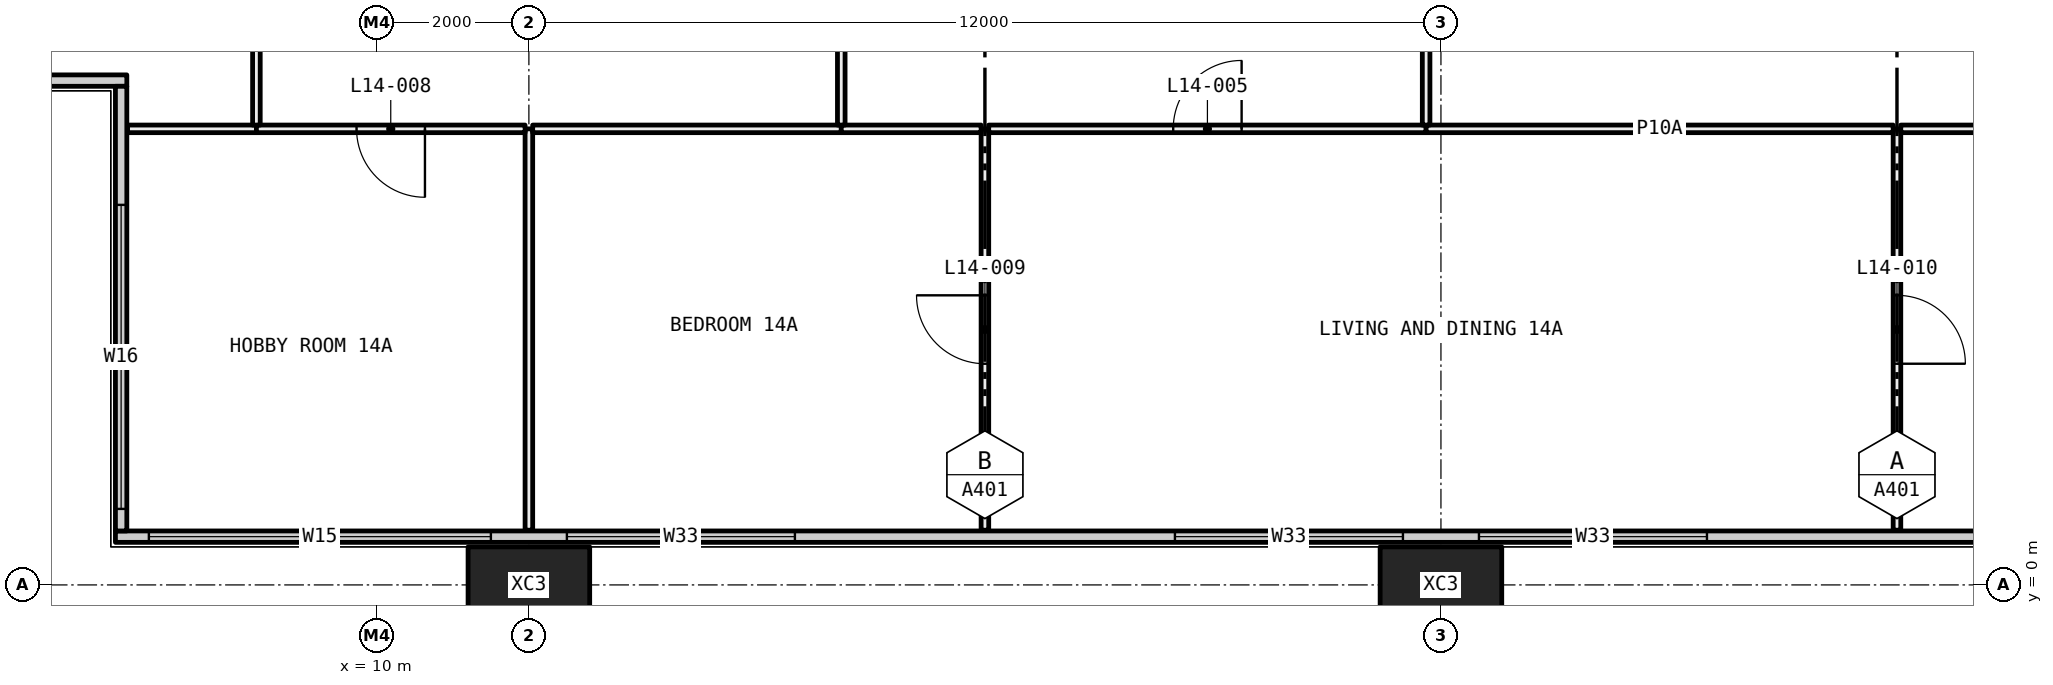
"""IFC4 building model, lengths in metres.
Left out: names, types, materials, properties, quantities, classifications, styles, units other than length and angle.
Written with IfcOpenShell. Run it as: python <this file> out.ifc"""

import sys

from ifc_helpers import new_model, si_unit, direction, frame, frame_2d, origin, origin_2d, place, context, subcontext, project, spatial, rectangle, hollow_rectangle, extrude, element, fill, save


model = new_model("IFC4")
c1 = context("Model", 3, precision=1e-05, world=origin(), true_north=direction((0.0, 1.0)))
c2 = subcontext(c1, "Body", "Model", "MODEL_VIEW")
j1 = project(units=[si_unit("LENGTHUNIT", "METRE"), si_unit("PLANEANGLEUNIT", "RADIAN")], contexts=[c1])
p1 = place(None, origin())
s1 = spatial("IfcSite", under=j1, at=p1, CompositionType="ELEMENT")
p2 = place(p1, origin())
s2 = spatial("IfcBuilding", under=s1, at=p2, CompositionType="ELEMENT")
p3 = place(p2, frame((0.0, 0.0, 61.05)))
s3 = spatial("IfcBuildingStorey", under=s2, at=p3, CompositionType="ELEMENT", Elevation=61.05)
for number, where, z_axis, x_axis in (
    (1, (12.0, 0.0, -0.4), (0.0, 0.0, 1.0), (1.0, 0.0, 0.0)),
    (2, (24.0, 0.0, -0.4), (0.0, 0.0, 1.0), (1.0, 0.0, 0.0)),
):
    element("IfcColumn", number, at=place(p3, frame(where, z_axis=z_axis, x_axis=x_axis)), inside=s3, PredefinedType="COLUMN", context=c2, shape_type="SweptSolid", body=[
        extrude(hollow_rectangle(XDim=1.6, YDim=1.0, WallThickness=0.065, at=origin_2d()), origin(), (0.0, 0.0, 1.0), 3.45),
    ])
p4 = place(p3, frame((6.56, 0.635, 0.0), z_axis=(0.0, 0.0, 1.0), x_axis=(1.0, 0.0, 0.0)))
e3 = element("IfcWall", 3, at=p4, inside=s3, PredefinedType="ELEMENTEDWALL", context=c2, shape_type="SweptSolid", body=[
    extrude(rectangle(XDim=58.88, YDim=0.15, at=frame_2d((29.44, 0.0))), origin(), (0.0, 0.0, 1.0), 3.05),
])
p5 = place(p4, frame((0.44, 0.0, 0.45)))
e4 = element("IfcOpeningElement", 4, at=p5, cuts=e3, PredefinedType="OPENING", context=c2, shape_type="SweptSolid", body=[
    extrude(rectangle(XDim=4.5, YDim=2.55, at=frame_2d((2.25, 1.275))), frame((0.0, 0.085, 0.0), z_axis=(0.0, -1.0, 0.0), x_axis=(1.0, 0.0, 0.0)), (0.0, 0.0, 1.0), 0.17),
])
p6 = place(p4, frame((5.94, 0.0, 0.45)))
e5 = element("IfcOpeningElement", 5, at=p6, cuts=e3, PredefinedType="OPENING", context=c2, shape_type="SweptSolid", body=[
    extrude(rectangle(XDim=3.0, YDim=2.55, at=frame_2d((1.5, 1.275))), frame((0.0, 0.085, 0.0), z_axis=(0.0, -1.0, 0.0), x_axis=(1.0, 0.0, 0.0)), (0.0, 0.0, 1.0), 0.17),
])
p7 = place(p4, frame((13.94, 0.0, 0.45)))
e6 = element("IfcOpeningElement", 6, at=p7, cuts=e3, PredefinedType="OPENING", context=c2, shape_type="SweptSolid", body=[
    extrude(rectangle(XDim=3.0, YDim=2.55, at=frame_2d((1.5, 1.275))), frame((0.0, 0.085, 0.0), z_axis=(0.0, -1.0, 0.0), x_axis=(1.0, 0.0, 0.0)), (0.0, 0.0, 1.0), 0.17),
])
p8 = place(p4, frame((17.94, 0.0, 0.45)))
e7 = element("IfcOpeningElement", 7, at=p8, cuts=e3, PredefinedType="OPENING", context=c2, shape_type="SweptSolid", body=[
    extrude(rectangle(XDim=3.0, YDim=2.55, at=frame_2d((1.5, 1.275))), frame((0.0, 0.085, 0.0), z_axis=(0.0, -1.0, 0.0), x_axis=(1.0, 0.0, 0.0)), (0.0, 0.0, 1.0), 0.17),
])
p9 = place(p4, frame((26.94, 0.0, 0.45)))
e8 = element("IfcOpeningElement", 8, at=p9, cuts=e3, PredefinedType="OPENING", context=c2, shape_type="SweptSolid", body=[
    extrude(rectangle(XDim=2.0, YDim=2.55, at=frame_2d((1.0, 1.275))), frame((0.0, 0.085, 0.0), z_axis=(0.0, -1.0, 0.0), x_axis=(1.0, 0.0, 0.0)), (0.0, 0.0, 1.0), 0.17),
])
p10 = place(p4, frame((29.94, 0.0, 0.45)))
e9 = element("IfcOpeningElement", 9, at=p10, cuts=e3, PredefinedType="OPENING", context=c2, shape_type="SweptSolid", body=[
    extrude(rectangle(XDim=3.0, YDim=2.55, at=frame_2d((1.5, 1.275))), frame((0.0, 0.085, 0.0), z_axis=(0.0, -1.0, 0.0), x_axis=(1.0, 0.0, 0.0)), (0.0, 0.0, 1.0), 0.17),
])
p11 = place(p4, frame((37.94, 0.0, 0.45)))
e10 = element("IfcOpeningElement", 10, at=p11, cuts=e3, PredefinedType="OPENING", context=c2, shape_type="SweptSolid", body=[
    extrude(rectangle(XDim=3.0, YDim=2.55, at=frame_2d((1.5, 1.275))), frame((0.0, 0.085, 0.0), z_axis=(0.0, -1.0, 0.0), x_axis=(1.0, 0.0, 0.0)), (0.0, 0.0, 1.0), 0.17),
])
p12 = place(p4, frame((41.94, 0.0, 0.45)))
e11 = element("IfcOpeningElement", 11, at=p12, cuts=e3, PredefinedType="OPENING", context=c2, shape_type="SweptSolid", body=[
    extrude(rectangle(XDim=3.0, YDim=2.55, at=frame_2d((1.5, 1.275))), frame((0.0, 0.085, 0.0), z_axis=(0.0, -1.0, 0.0), x_axis=(1.0, 0.0, 0.0)), (0.0, 0.0, 1.0), 0.17),
])
p13 = place(p4, frame((50.94, 0.0, 0.45)))
e12 = element("IfcOpeningElement", 12, at=p13, cuts=e3, PredefinedType="OPENING", context=c2, shape_type="SweptSolid", body=[
    extrude(rectangle(XDim=2.0, YDim=2.55, at=frame_2d((1.0, 1.275))), frame((0.0, 0.085, 0.0), z_axis=(0.0, -1.0, 0.0), x_axis=(1.0, 0.0, 0.0)), (0.0, 0.0, 1.0), 0.17),
])
p14 = place(p4, frame((53.94, 0.0, 0.45)))
e13 = element("IfcOpeningElement", 13, at=p14, cuts=e3, PredefinedType="OPENING", context=c2, shape_type="SweptSolid", body=[
    extrude(rectangle(XDim=4.5, YDim=2.55, at=frame_2d((2.25, 1.275))), frame((0.0, 0.085, 0.0), z_axis=(0.0, -1.0, 0.0), x_axis=(1.0, 0.0, 0.0)), (0.0, 0.0, 1.0), 0.17),
])
p15 = place(p3, frame((0.56, 6.635, 0.0), z_axis=(0.0, 0.0, 1.0), x_axis=(1.0, 0.0, 0.0)))
e14 = element("IfcWall", 14, at=p15, inside=s3, PredefinedType="ELEMENTEDWALL", context=c2, shape_type="SweptSolid", body=[
    extrude(rectangle(XDim=6.15, YDim=0.15, at=frame_2d((3.075, 0.0))), origin(), (0.0, 0.0, 1.0), 3.05),
])
p16 = place(p15, frame((0.44, 0.0, 0.45)))
e15 = element("IfcOpeningElement", 15, at=p16, cuts=e14, PredefinedType="OPENING", context=c2, shape_type="SweptSolid", body=[
    extrude(rectangle(XDim=4.0, YDim=2.55, at=frame_2d((2.0, 1.275))), frame((0.0, 0.085, 0.0), z_axis=(0.0, -1.0, 0.0), x_axis=(1.0, 0.0, 0.0)), (0.0, 0.0, 1.0), 0.17),
])
p17 = place(p3, frame((6.635, 0.71, 0.0), z_axis=(0.0, 0.0, 1.0), x_axis=(0.0, 1.0, 0.0)))
e16 = element("IfcWall", 16, at=p17, inside=s3, PredefinedType="ELEMENTEDWALL", context=c2, shape_type="SweptSolid", body=[
    extrude(rectangle(XDim=5.85, YDim=0.15, at=frame_2d((2.925, 0.0))), origin(), (0.0, 0.0, 1.0), 3.05),
])
p18 = place(p17, frame((0.29, 0.0, 0.45)))
e17 = element("IfcOpeningElement", 17, at=p18, cuts=e16, PredefinedType="OPENING", context=c2, shape_type="SweptSolid", body=[
    extrude(rectangle(XDim=4.0, YDim=2.55, at=frame_2d((2.0, 1.275))), frame((0.0, 0.085, 0.0), z_axis=(0.0, -1.0, 0.0), x_axis=(1.0, 0.0, 0.0)), (0.0, 0.0, 1.0), 0.17),
])
p19 = place(p3, frame((12.0, 0.72, 0.0), z_axis=(0.0, 0.0, 1.0), x_axis=(0.0, 1.0, 0.0)))
e18 = element("IfcWall", 18, at=p19, inside=s3, PredefinedType="PARTITIONING", context=c2, shape_type="SweptSolid", body=[
    extrude(rectangle(XDim=5.28, YDim=0.1, at=frame_2d((2.64, 0.0))), origin(), (0.0, 0.0, 1.0), 2.45),
])
p20 = place(p3, frame((8.415, 6.0, 0.0), z_axis=(0.0, 0.0, 1.0), x_axis=(-1.0, 0.0, 0.0)))
e19 = element("IfcWall", 19, at=p20, inside=s3, PredefinedType="PARTITIONING", context=c2, shape_type="SweptSolid", body=[
    extrude(rectangle(XDim=1.695, YDim=0.1, at=frame_2d((0.848, 0.0))), origin(), (0.0, 0.0, 1.0), 3.05),
])
p21 = place(p3, frame((11.95, 6.0, 0.0), z_axis=(0.0, 0.0, 1.0), x_axis=(-1.0, 0.0, 0.0)))
e20 = element("IfcWall", 20, at=p21, inside=s3, PredefinedType="PARTITIONING", context=c2, shape_type="SweptSolid", body=[
    extrude(rectangle(XDim=3.535, YDim=0.1, at=frame_2d((1.768, 0.0))), origin(), (0.0, 0.0, 1.0), 2.45),
])
p22 = place(p21, frame((1.317, 0.0, 0.0)))
e21 = element("IfcOpeningElement", 21, at=p22, cuts=e20, PredefinedType="OPENING", context=c2, shape_type="SweptSolid", body=[
    extrude(rectangle(XDim=0.9, YDim=2.1, at=frame_2d((0.45, 1.05))), frame((0.0, 0.06, 0.0), z_axis=(0.0, -1.0, 0.0), x_axis=(1.0, 0.0, 0.0)), (0.0, 0.0, 1.0), 0.12),
])
p23 = place(p3, frame((18.0, 0.72, 0.0), z_axis=(0.0, 0.0, 1.0), x_axis=(0.0, 1.0, 0.0)))
e22 = element("IfcWall", 22, at=p23, inside=s3, PredefinedType="PARTITIONING", context=c2, shape_type="SweptSolid", body=[
    extrude(rectangle(XDim=5.28, YDim=0.1, at=frame_2d((2.64, 0.0))), origin(), (0.0, 0.0, 1.0), 3.05),
])
p24 = place(p23, frame((2.19, 0.0, 0.0)))
e23 = element("IfcOpeningElement", 23, at=p24, cuts=e22, PredefinedType="OPENING", context=c2, shape_type="SweptSolid", body=[
    extrude(rectangle(XDim=0.9, YDim=2.1, at=frame_2d((0.45, 1.05))), frame((0.0, 0.06, 0.0), z_axis=(0.0, -1.0, 0.0), x_axis=(1.0, 0.0, 0.0)), (0.0, 0.0, 1.0), 0.12),
])
p25 = place(p3, frame((16.11, 6.0, 0.0), z_axis=(0.0, 0.0, 1.0), x_axis=(-1.0, 0.0, 0.0)))
e24 = element("IfcWall", 24, at=p25, inside=s3, PredefinedType="PARTITIONING", context=c2, shape_type="SweptSolid", body=[
    extrude(rectangle(XDim=4.06, YDim=0.1, at=frame_2d((2.03, 0.0))), origin(), (0.0, 0.0, 1.0), 2.45),
])
p26 = place(p3, frame((17.95, 6.0, 0.0), z_axis=(0.0, 0.0, 1.0), x_axis=(-1.0, 0.0, 0.0)))
e25 = element("IfcWall", 25, at=p26, inside=s3, PredefinedType="PARTITIONING", context=c2, shape_type="SweptSolid", body=[
    extrude(rectangle(XDim=1.84, YDim=0.1, at=frame_2d((0.92, 0.0))), origin(), (0.0, 0.0, 1.0), 3.05),
])
p27 = place(p3, frame((30.0, 0.72, 0.0), z_axis=(0.0, 0.0, 1.0), x_axis=(0.0, 1.0, 0.0)))
e26 = element("IfcWall", 26, at=p27, inside=s3, PredefinedType="PARTITIONING", context=c2, shape_type="SweptSolid", body=[
    extrude(rectangle(XDim=5.28, YDim=0.1, at=frame_2d((2.64, 0.0))), origin(), (0.0, 0.0, 1.0), 3.05),
])
p28 = place(p27, frame((2.19, 0.0, 0.0)))
e27 = element("IfcOpeningElement", 27, at=p28, cuts=e26, PredefinedType="OPENING", context=c2, shape_type="SweptSolid", body=[
    extrude(rectangle(XDim=0.9, YDim=2.1, at=frame_2d((0.45, 1.05))), frame((0.0, 0.06, 0.0), z_axis=(0.0, -1.0, 0.0), x_axis=(1.0, 0.0, 0.0)), (0.0, 0.0, 1.0), 0.12),
])
p29 = place(p3, frame((23.805, 6.0, 0.0), z_axis=(0.0, 0.0, 1.0), x_axis=(-1.0, 0.0, 0.0)))
e28 = element("IfcWall", 28, at=p29, inside=s3, PredefinedType="PARTITIONING", context=c2, shape_type="SweptSolid", body=[
    extrude(rectangle(XDim=5.755, YDim=0.1, at=frame_2d((2.877, 0.0))), origin(), (0.0, 0.0, 1.0), 3.05),
])
p30 = place(p29, frame((2.427, 0.0, 0.0)))
e29 = element("IfcOpeningElement", 29, at=p30, cuts=e28, PredefinedType="OPENING", context=c2, shape_type="SweptSolid", body=[
    extrude(rectangle(XDim=0.9, YDim=2.1, at=frame_2d((0.45, 1.05))), frame((0.0, 0.06, 0.0), z_axis=(0.0, -1.0, 0.0), x_axis=(1.0, 0.0, 0.0)), (0.0, 0.0, 1.0), 0.12),
])
p31 = place(p3, frame((29.95, 6.0, 0.0), z_axis=(0.0, 0.0, 1.0), x_axis=(-1.0, 0.0, 0.0)))
e30 = element("IfcWall", 30, at=p31, inside=s3, PredefinedType="PARTITIONING", context=c2, shape_type="SweptSolid", body=[
    extrude(rectangle(XDim=6.145, YDim=0.1, at=frame_2d((3.073, 0.0))), origin(), (0.0, 0.0, 1.0), 2.45),
])
p32 = place(p3, frame((31.425, 6.0, 0.0), z_axis=(0.0, 0.0, 1.0), x_axis=(-1.0, 0.0, 0.0)))
e31 = element("IfcWall", 31, at=p32, inside=s3, PredefinedType="PARTITIONING", context=c2, shape_type="SweptSolid", body=[
    extrude(rectangle(XDim=1.375, YDim=0.1, at=frame_2d((0.688, 0.0))), origin(), (0.0, 0.0, 1.0), 3.05),
])
p33 = place(p3, frame((8.415, 6.05, 0.0), z_axis=(0.0, 0.0, 1.0), x_axis=(0.0, 1.0, 0.0)))
e32 = element("IfcWall", 32, at=p33, inside=s3, PredefinedType="PARTITIONING", context=c2, shape_type="SweptSolid", body=[
    extrude(rectangle(XDim=5.875, YDim=0.1, at=frame_2d((2.938, 0.0))), origin(), (0.0, 0.0, 1.0), 2.45),
])
p34 = place(p33, frame((2.488, 0.0, 0.0)))
e33 = element("IfcOpeningElement", 33, at=p34, cuts=e32, PredefinedType="OPENING", context=c2, shape_type="SweptSolid", body=[
    extrude(rectangle(XDim=0.9, YDim=2.1, at=frame_2d((0.45, 1.05))), frame((0.0, 0.06, 0.0), z_axis=(0.0, -1.0, 0.0), x_axis=(1.0, 0.0, 0.0)), (0.0, 0.0, 1.0), 0.12),
])
p35 = place(p3, frame((16.11, 6.05, 0.0), z_axis=(0.0, 0.0, 1.0), x_axis=(0.0, 1.0, 0.0)))
e34 = element("IfcWall", 34, at=p35, inside=s3, PredefinedType="PARTITIONING", context=c2, shape_type="SweptSolid", body=[
    extrude(rectangle(XDim=5.95, YDim=0.1, at=frame_2d((2.975, 0.0))), origin(), (0.0, 0.0, 1.0), 2.45),
])
p36 = place(p3, frame((23.805, 6.05, 0.0), z_axis=(0.0, 0.0, 1.0), x_axis=(0.0, 1.0, 0.0)))
e35 = element("IfcWall", 35, at=p36, inside=s3, PredefinedType="PARTITIONING", context=c2, shape_type="SweptSolid", body=[
    extrude(rectangle(XDim=5.15, YDim=0.1, at=frame_2d((2.575, 0.0))), origin(), (0.0, 0.0, 1.0), 3.05),
])
p37 = place(p36, frame((2.125, 0.0, 0.0)))
e36 = element("IfcOpeningElement", 36, at=p37, cuts=e35, PredefinedType="OPENING", context=c2, shape_type="SweptSolid", body=[
    extrude(rectangle(XDim=0.9, YDim=2.1, at=frame_2d((0.45, 1.05))), frame((0.0, 0.06, 0.0), z_axis=(0.0, -1.0, 0.0), x_axis=(1.0, 0.0, 0.0)), (0.0, 0.0, 1.0), 0.12),
])
p38 = place(p5, origin())
e37 = element("IfcWindow", 37, at=p38, inside=s3, PartitioningType="SINGLE_PANEL", PredefinedType="WINDOW", context=c2, shape_type="SweptSolid", body=[
    extrude(rectangle(XDim=4.5, YDim=2.55, at=frame_2d((2.25, 1.275))), frame((0.0, 0.03, 0.0), z_axis=(0.0, -1.0, 0.0), x_axis=(1.0, 0.0, 0.0)), (0.0, 0.0, 1.0), 0.06),
])
fill(e4, e37)
p39 = place(p6, origin())
e38 = element("IfcWindow", 38, at=p39, inside=s3, PartitioningType="SINGLE_PANEL", PredefinedType="WINDOW", context=c2, shape_type="SweptSolid", body=[
    extrude(rectangle(XDim=3.0, YDim=2.55, at=frame_2d((1.5, 1.275))), frame((0.0, 0.03, 0.0), z_axis=(0.0, -1.0, 0.0), x_axis=(1.0, 0.0, 0.0)), (0.0, 0.0, 1.0), 0.06),
])
fill(e5, e38)
p40 = place(p7, origin())
e39 = element("IfcWindow", 39, at=p40, inside=s3, PartitioningType="SINGLE_PANEL", PredefinedType="WINDOW", context=c2, shape_type="SweptSolid", body=[
    extrude(rectangle(XDim=3.0, YDim=2.55, at=frame_2d((1.5, 1.275))), frame((0.0, 0.03, 0.0), z_axis=(0.0, -1.0, 0.0), x_axis=(1.0, 0.0, 0.0)), (0.0, 0.0, 1.0), 0.06),
])
fill(e6, e39)
p41 = place(p8, origin())
e40 = element("IfcWindow", 40, at=p41, inside=s3, PartitioningType="SINGLE_PANEL", PredefinedType="WINDOW", context=c2, shape_type="SweptSolid", body=[
    extrude(rectangle(XDim=3.0, YDim=2.55, at=frame_2d((1.5, 1.275))), frame((0.0, 0.03, 0.0), z_axis=(0.0, -1.0, 0.0), x_axis=(1.0, 0.0, 0.0)), (0.0, 0.0, 1.0), 0.06),
])
fill(e7, e40)
p42 = place(p18, origin())
e41 = element("IfcWindow", 41, at=p42, inside=s3, PartitioningType="SINGLE_PANEL", PredefinedType="WINDOW", context=c2, shape_type="SweptSolid", body=[
    extrude(rectangle(XDim=4.0, YDim=2.55, at=frame_2d((2.0, 1.275))), frame((0.0, 0.03, 0.0), z_axis=(0.0, -1.0, 0.0), x_axis=(1.0, 0.0, 0.0)), (0.0, 0.0, 1.0), 0.06),
])
fill(e17, e41)
p43 = place(p30, frame((0.9, 0.0, 0.0), x_axis=(-1.0, 0.0, 0.0)))
e42 = element("IfcDoor", 42, at=p43, inside=s3, OperationType="SINGLE_SWING_LEFT", PredefinedType="DOOR", context=c2, shape_type="SweptSolid", body=[
    extrude(rectangle(XDim=0.9, YDim=2.1, at=frame_2d((0.45, 1.05))), frame((0.0, 0.025, 0.0), z_axis=(0.0, -1.0, 0.0), x_axis=(1.0, 0.0, 0.0)), (0.0, 0.0, 1.0), 0.05),
])
fill(e29, e42)
p44 = place(p22, origin())
e43 = element("IfcDoor", 43, at=p44, inside=s3, OperationType="SINGLE_SWING_RIGHT", PredefinedType="DOOR", context=c2, shape_type="SweptSolid", body=[
    extrude(rectangle(XDim=0.9, YDim=2.1, at=frame_2d((0.45, 1.05))), frame((0.0, 0.025, 0.0), z_axis=(0.0, -1.0, 0.0), x_axis=(1.0, 0.0, 0.0)), (0.0, 0.0, 1.0), 0.05),
])
fill(e21, e43)
p45 = place(p24, origin())
e44 = element("IfcDoor", 44, at=p45, inside=s3, OperationType="SINGLE_SWING_LEFT", PredefinedType="DOOR", context=c2, shape_type="SweptSolid", body=[
    extrude(rectangle(XDim=0.9, YDim=2.1, at=frame_2d((0.45, 1.05))), frame((0.0, 0.025, 0.0), z_axis=(0.0, -1.0, 0.0), x_axis=(1.0, 0.0, 0.0)), (0.0, 0.0, 1.0), 0.05),
])
fill(e23, e44)
p46 = place(p28, frame((0.9, 0.0, 0.0), x_axis=(-1.0, 0.0, 0.0)))
e45 = element("IfcDoor", 45, at=p46, inside=s3, OperationType="SINGLE_SWING_LEFT", PredefinedType="DOOR", context=c2, shape_type="SweptSolid", body=[
    extrude(rectangle(XDim=0.9, YDim=2.1, at=frame_2d((0.45, 1.05))), frame((0.0, 0.025, 0.0), z_axis=(0.0, -1.0, 0.0), x_axis=(1.0, 0.0, 0.0)), (0.0, 0.0, 1.0), 0.05),
])
fill(e27, e45)
save(model, sys.argv[1])
